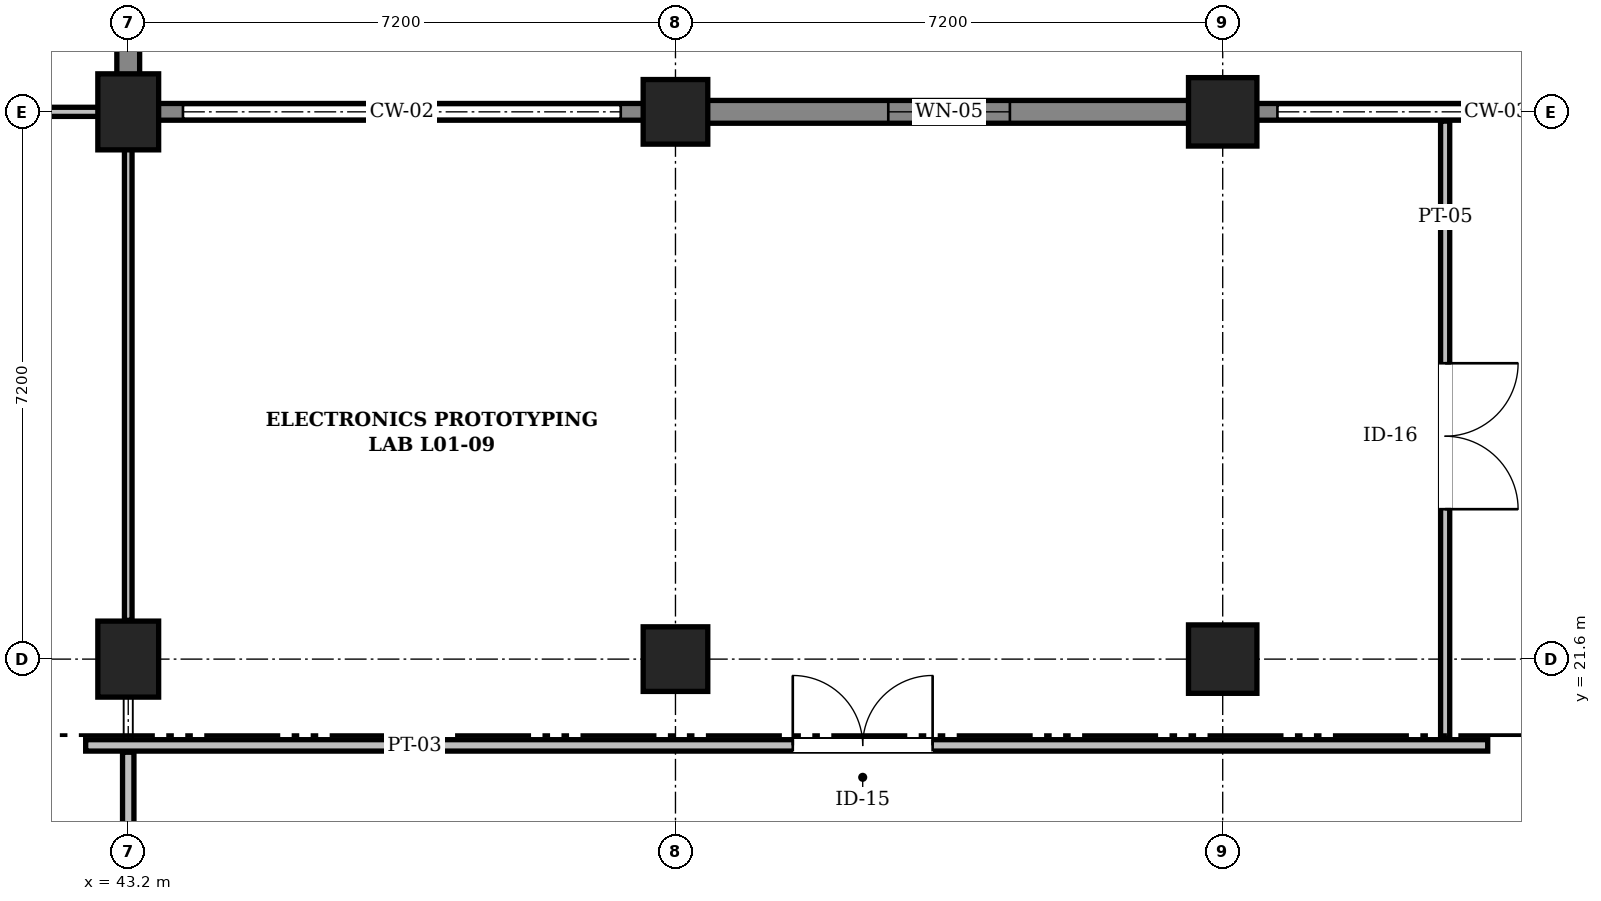
"""IFC4 building model, lengths in metres.
Left out: names, types, materials, properties, quantities, classifications, styles, units other than length and angle.
Written with IfcOpenShell. Run it as: python <this file> out.ifc"""

import sys

from ifc_helpers import new_model, si_unit, direction, frame, frame_2d, origin, origin_2d, place, context, subcontext, project, spatial, rectangle, extrude, element, fill, save


model = new_model("IFC4")
c1 = context("Model", 3, precision=1e-05, world=origin(), true_north=direction((0.0, 1.0)))
c2 = subcontext(c1, "Body", "Model", "MODEL_VIEW")
j1 = project(units=[si_unit("LENGTHUNIT", "METRE"), si_unit("PLANEANGLEUNIT", "RADIAN")], contexts=[c1])
p1 = place(None, origin())
s1 = spatial("IfcSite", under=j1, at=p1, CompositionType="ELEMENT")
p2 = place(p1, origin())
s2 = spatial("IfcBuilding", under=s1, at=p2, CompositionType="ELEMENT")
p3 = place(p2, frame((0.0, 0.0, 4.8)))
s3 = spatial("IfcBuildingStorey", under=s2, at=p3, CompositionType="ELEMENT", Elevation=4.8)
for number, where, z_axis, x_axis in (
    (1, (43.2, 21.6, 0.0), (0.0, 0.0, 1.0), (1.0, 0.0, 0.0)),
    (2, (43.2, 28.8, 0.0), (0.0, 0.0, 1.0), (1.0, 0.0, 0.0)),
):
    element("IfcColumn", number, at=place(p3, frame(where, z_axis=z_axis, x_axis=x_axis)), inside=s3, PredefinedType="COLUMN", context=c2, shape_type="SweptSolid", body=[
        extrude(rectangle(XDim=0.8, YDim=1.0, at=origin_2d()), origin(), (0.0, 0.0, 1.0), 4.8),
    ])
for number, where, z_axis, x_axis in (
    (3, (50.4, 21.6, 0.0), (0.0, 0.0, 1.0), (1.0, 0.0, 0.0)),
    (4, (50.4, 28.8, 0.0), (0.0, 0.0, 1.0), (1.0, 0.0, 0.0)),
):
    element("IfcColumn", number, at=place(p3, frame(where, z_axis=z_axis, x_axis=x_axis)), inside=s3, PredefinedType="COLUMN", context=c2, shape_type="SweptSolid", body=[
        extrude(rectangle(XDim=0.85, YDim=0.85, at=origin_2d()), origin(), (0.0, 0.0, 1.0), 4.8),
    ])
for number, where, z_axis, x_axis in (
    (5, (57.6, 21.6, 0.0), (0.0, 0.0, 1.0), (1.0, 0.0, 0.0)),
    (6, (57.6, 28.8, 0.0), (0.0, 0.0, 1.0), (1.0, 0.0, 0.0)),
):
    element("IfcColumn", number, at=place(p3, frame(where, z_axis=z_axis, x_axis=x_axis)), inside=s3, PredefinedType="COLUMN", context=c2, shape_type="SweptSolid", body=[
        extrude(rectangle(XDim=0.9, YDim=0.9, at=origin_2d()), origin(), (0.0, 0.0, 1.0), 4.8),
    ])
p4 = place(p3, frame((43.2, 36.0, 0.0), z_axis=(0.0, 0.0, 1.0), x_axis=(0.0, -1.0, 0.0)))
e7 = element("IfcWall", 7, at=p4, inside=s3, PredefinedType="SOLIDWALL", context=c2, shape_type="SweptSolid", body=[
    extrude(rectangle(XDim=7.034, YDim=0.3, at=frame_2d((3.517, 0.0))), origin(), (0.0, 0.0, 1.0), 4.52),
])
p5 = place(p4, frame((4.452, 0.0, 0.95)))
e8 = element("IfcOpeningElement", 8, at=p5, cuts=e7, PredefinedType="OPENING", context=c2, shape_type="SweptSolid", body=[
    extrude(rectangle(XDim=1.45, YDim=1.3, at=frame_2d((0.725, 0.65))), frame((0.0, 0.162, 0.0), z_axis=(0.0, -1.0, 0.0), x_axis=(1.0, 0.0, 0.0)), (0.0, 0.0, 1.0), 0.324),
])
p6 = place(p3, frame((43.05, 28.8, 0.0), z_axis=(0.0, 0.0, 1.0), x_axis=(1.0, 0.0, 0.0)))
e9 = element("IfcWall", 9, at=p6, inside=s3, PredefinedType="SOLIDWALL", context=c2, shape_type="SweptSolid", body=[
    extrude(rectangle(XDim=7.35, YDim=0.22, at=frame_2d((3.675, 0.0))), origin(), (0.0, 0.0, 1.0), 1.24),
])
p7 = place(p3, frame((50.4, 28.8, 0.0), z_axis=(0.0, 0.0, 1.0), x_axis=(1.0, 0.0, 0.0)))
e10 = element("IfcWall", 10, at=p7, inside=s3, PredefinedType="SOLIDWALL", context=c2, shape_type="SweptSolid", body=[
    extrude(rectangle(XDim=7.2, YDim=0.3, at=frame_2d((3.6, 0.0))), origin(), (0.0, 0.0, 1.0), 4.52),
])
p8 = place(p7, frame((2.8, 0.0, 0.95)))
e11 = element("IfcOpeningElement", 11, at=p8, cuts=e10, PredefinedType="OPENING", context=c2, shape_type="SweptSolid", body=[
    extrude(rectangle(XDim=1.6, YDim=1.3, at=frame_2d((0.8, 0.65))), frame((0.0, 0.162, 0.0), z_axis=(0.0, -1.0, 0.0), x_axis=(1.0, 0.0, 0.0)), (0.0, 0.0, 1.0), 0.324),
])
p9 = place(p3, frame((57.6, 28.8, 0.0), z_axis=(0.0, 0.0, 1.0), x_axis=(1.0, 0.0, 0.0)))
e12 = element("IfcWall", 12, at=p9, inside=s3, PredefinedType="SOLIDWALL", context=c2, shape_type="SweptSolid", body=[
    extrude(rectangle(XDim=7.2, YDim=0.22, at=frame_2d((3.6, 0.0))), origin(), (0.0, 0.0, 1.0), 1.24),
])
p10 = place(p3, frame((36.41, 28.8, 0.0), z_axis=(0.0, 0.0, 1.0), x_axis=(1.0, 0.0, 0.0)))
e13 = element("IfcWall", 13, at=p10, inside=s3, PredefinedType="PARTITIONING", context=c2, shape_type="SweptSolid", body=[
    extrude(rectangle(XDim=6.628, YDim=0.12, at=frame_2d((3.314, 0.0))), origin(), (0.0, 0.0, 1.0), 3.9),
])
p11 = place(p3, frame((42.64, 20.465, 0.0), z_axis=(0.0, 0.0, 1.0), x_axis=(1.0, 0.0, 0.0)))
e14 = element("IfcWall", 14, at=p11, inside=s3, PredefinedType="PARTITIONING", context=c2, shape_type="SweptSolid", body=[
    extrude(rectangle(XDim=18.447, YDim=0.15, at=frame_2d((9.223, 0.0))), origin(), (0.0, 0.0, 1.0), 4.46),
])
p12 = place(p11, frame((9.303, 0.0, 0.0)))
e15 = element("IfcOpeningElement", 15, at=p12, cuts=e14, PredefinedType="OPENING", context=c2, shape_type="SweptSolid", body=[
    extrude(rectangle(XDim=1.84, YDim=2.3, at=frame_2d((0.92, 1.15))), frame((0.0, 0.087, 0.0), z_axis=(0.0, -1.0, 0.0), x_axis=(1.0, 0.0, 0.0)), (0.0, 0.0, 1.0), 0.174),
])
p13 = place(p3, frame((43.2, 14.577, 0.0), z_axis=(0.0, 0.0, 1.0), x_axis=(0.0, 1.0, 0.0)))
e16 = element("IfcWall", 16, at=p13, inside=s3, PredefinedType="PARTITIONING", context=c2, shape_type="SweptSolid", body=[
    extrude(rectangle(XDim=5.798, YDim=0.15, at=frame_2d((2.899, 0.0))), origin(), (0.0, 0.0, 1.0), 4.08),
])
p14 = place(p3, frame((60.527, 20.555, 0.0), z_axis=(0.0, 0.0, 1.0), x_axis=(0.0, 1.0, 0.0)))
e17 = element("IfcWall", 17, at=p14, inside=s3, PredefinedType="PARTITIONING", context=c2, shape_type="SweptSolid", body=[
    extrude(rectangle(XDim=8.123, YDim=0.12, at=frame_2d((4.062, 0.0))), origin(), (0.0, 0.0, 1.0), 4.46),
])
p15 = place(p14, frame((3.018, 0.0, 0.0)))
e18 = element("IfcOpeningElement", 18, at=p15, cuts=e17, PredefinedType="OPENING", context=c2, shape_type="SweptSolid", body=[
    extrude(rectangle(XDim=1.92, YDim=2.32, at=frame_2d((0.96, 1.16))), frame((0.0, 0.072, 0.0), z_axis=(0.0, -1.0, 0.0), x_axis=(1.0, 0.0, 0.0)), (0.0, 0.0, 1.0), 0.144),
])
p16 = place(p3, frame((43.2, 22.11, 0.0), z_axis=(0.0, 0.0, 1.0), x_axis=(0.0, 1.0, 0.0)))
e19 = element("IfcWall", 19, at=p16, inside=s3, PredefinedType="PARTITIONING", context=c2, shape_type="SweptSolid", body=[
    extrude(rectangle(XDim=6.568, YDim=0.1, at=frame_2d((3.284, 0.0))), origin(), (0.0, 0.0, 1.0), 4.08),
])
p17 = place(p8, origin())
e20 = element("IfcWindow", 20, at=p17, inside=s3, PartitioningType="SINGLE_PANEL", PredefinedType="WINDOW", context=c2, shape_type="SweptSolid", body=[
    extrude(rectangle(XDim=1.6, YDim=1.3, at=frame_2d((0.8, 0.65))), frame((0.0, 0.03, 0.0), z_axis=(0.0, -1.0, 0.0), x_axis=(1.0, 0.0, 0.0)), (0.0, 0.0, 1.0), 0.06),
])
fill(e11, e20)
p18 = place(p12, origin())
e21 = element("IfcDoor", 21, at=p18, inside=s3, OperationType="DOUBLE_DOOR_SINGLE_SWING", PredefinedType="DOOR", context=c2, shape_type="SweptSolid", body=[
    extrude(rectangle(XDim=1.84, YDim=2.3, at=frame_2d((0.92, 1.15))), frame((0.0, 0.025, 0.0), z_axis=(0.0, -1.0, 0.0), x_axis=(1.0, 0.0, 0.0)), (0.0, 0.0, 1.0), 0.05),
])
fill(e15, e21)
p19 = place(p15, frame((1.92, 0.0, 0.0), z_axis=(0.0, 0.0, 1.0), x_axis=(-1.0, 0.0, 0.0)))
e22 = element("IfcDoor", 22, at=p19, inside=s3, OperationType="DOUBLE_DOOR_SINGLE_SWING", PredefinedType="DOOR", context=c2, shape_type="SweptSolid", body=[
    extrude(rectangle(XDim=1.92, YDim=2.32, at=frame_2d((0.96, 1.16))), frame((0.0, 0.025, 0.0), z_axis=(0.0, -1.0, 0.0), x_axis=(1.0, 0.0, 0.0)), (0.0, 0.0, 1.0), 0.05),
])
fill(e18, e22)
save(model, sys.argv[1])
